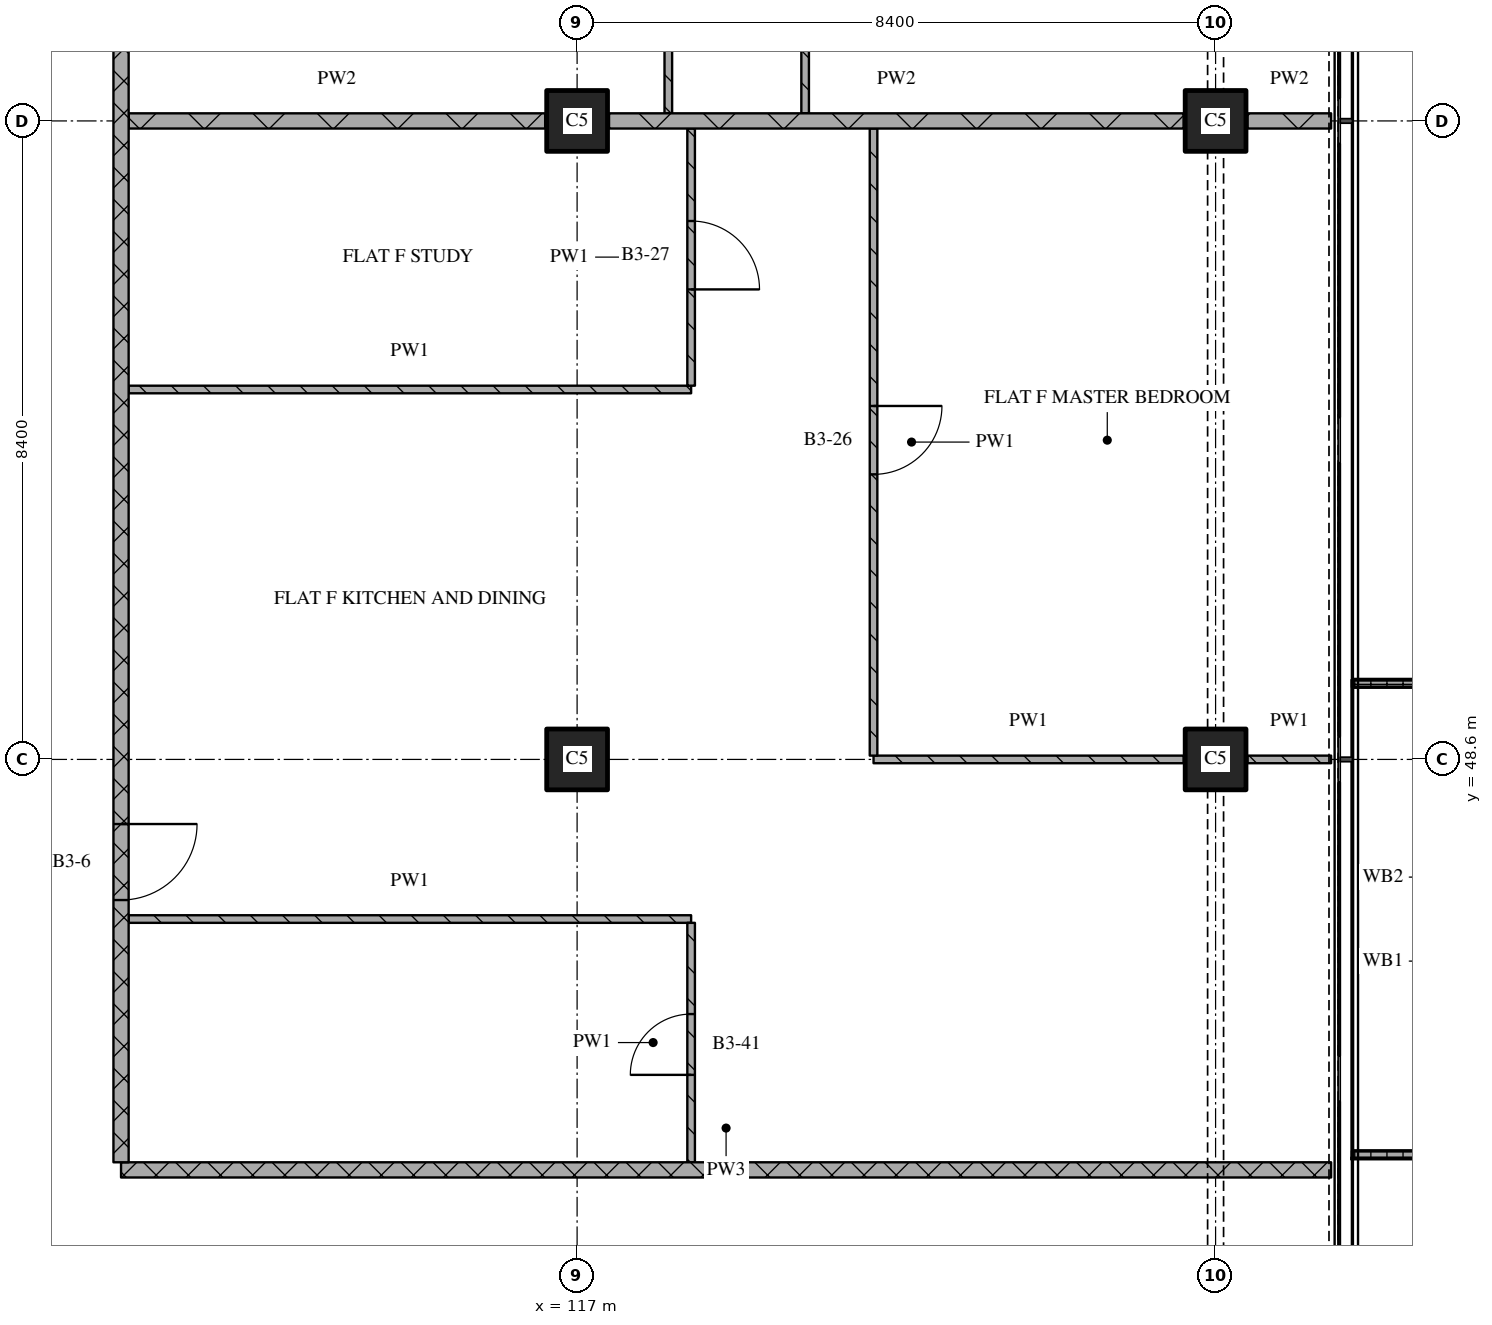
"""IFC4 building model, lengths in metres.
Left out: names, types, materials, properties, quantities, classifications, styles, units other than length and angle.
Written with IfcOpenShell. Run it as: python <this file> out.ifc"""

import sys

from ifc_helpers import new_model, si_unit, direction, frame, frame_2d, origin, origin_2d, place, context, subcontext, project, spatial, polyline, rectangle, outline, extrude, element, fill, save


model = new_model("IFC4")
c1 = context("Model", 3, precision=1e-05, world=origin(), true_north=direction((0.0, 1.0)))
c2 = subcontext(c1, "Body", "Model", "MODEL_VIEW")
j1 = project(units=[si_unit("LENGTHUNIT", "METRE"), si_unit("PLANEANGLEUNIT", "RADIAN")], contexts=[c1])
p1 = place(None, origin())
s1 = spatial("IfcSite", under=j1, at=p1, CompositionType="ELEMENT")
p2 = place(p1, origin())
s2 = spatial("IfcBuilding", under=s1, at=p2, CompositionType="ELEMENT")
p3 = place(p2, frame((0.0, 0.0, 120.45)))
s3 = spatial("IfcBuildingStorey", under=s2, at=p3, CompositionType="ELEMENT", Elevation=120.45)
for number, where, z_axis, x_axis in (
    (1, (117.0, 48.6, 0.0), (0.0, 0.0, 1.0), (1.0, 0.0, 0.0)),
    (2, (117.0, 57.0, 0.0), (0.0, 0.0, 1.0), (1.0, 0.0, 0.0)),
    (3, (125.4, 48.6, 0.0), (0.0, 0.0, 1.0), (1.0, 0.0, 0.0)),
    (4, (125.4, 57.0, 0.0), (0.0, 0.0, 1.0), (1.0, 0.0, 0.0)),
):
    element("IfcColumn", number, at=place(p3, frame(where, z_axis=z_axis, x_axis=x_axis)), inside=s3, PredefinedType="COLUMN", context=c2, shape_type="SweptSolid", body=[
        extrude(rectangle(XDim=0.8, YDim=0.8, at=origin_2d()), origin(), (0.0, 0.0, 1.0), 3.6),
    ])
p4 = place(p3, origin())
e5 = element("IfcWall", 5, at=p4, inside=s3, PredefinedType="SOLIDWALL", context=c2, shape_type="SweptSolid", body=[
    extrude(outline(polyline([(127.2, 43.35), (127.2, 43.45), (128.967, 43.45), (128.967, 49.55), (127.2, 49.55), (127.2, 49.65), (129.067, 49.65), (129.067, 43.35), (127.2, 43.35)])), origin(), (0.0, 0.0, 1.0), 1.0),
])
p5 = place(p3, frame((111.0, 43.2, 0.0), z_axis=(0.0, 0.0, 1.0), x_axis=(1.0, 0.0, 0.0)))
e6 = element("IfcWall", 6, at=p5, inside=s3, PredefinedType="PARTITIONING", context=c2, shape_type="SweptSolid", body=[
    extrude(rectangle(XDim=15.92, YDim=0.2, at=frame_2d((7.96, 0.0))), origin(), (0.0, 0.0, 1.0), 3.32),
])
p6 = place(p3, frame((111.1, 46.5, 0.0), z_axis=(0.0, 0.0, 1.0), x_axis=(1.0, 0.0, 0.0)))
e7 = element("IfcWall", 7, at=p6, inside=s3, PredefinedType="PARTITIONING", context=c2, shape_type="SweptSolid", body=[
    extrude(rectangle(XDim=7.4, YDim=0.1, at=frame_2d((3.7, 0.0))), origin(), (0.0, 0.0, 1.0), 3.32),
])
p7 = place(p3, frame((120.9, 48.6, 0.0), z_axis=(0.0, 0.0, 1.0), x_axis=(1.0, 0.0, 0.0)))
e8 = element("IfcWall", 8, at=p7, inside=s3, PredefinedType="PARTITIONING", context=c2, shape_type="SweptSolid", body=[
    extrude(rectangle(XDim=4.08, YDim=0.1, at=frame_2d((2.04, 0.0))), origin(), (0.0, 0.0, 1.0), 3.32),
])
p8 = place(p3, frame((125.82, 48.6, 0.0), z_axis=(0.0, 0.0, 1.0), x_axis=(1.0, 0.0, 0.0)))
e9 = element("IfcWall", 9, at=p8, inside=s3, PredefinedType="PARTITIONING", context=c2, shape_type="SweptSolid", body=[
    extrude(rectangle(XDim=1.1, YDim=0.1, at=frame_2d((0.55, 0.0))), origin(), (0.0, 0.0, 1.0), 3.32),
])
p9 = place(p3, frame((111.1, 53.467, 0.0), z_axis=(0.0, 0.0, 1.0), x_axis=(1.0, 0.0, 0.0)))
e10 = element("IfcWall", 10, at=p9, inside=s3, PredefinedType="PARTITIONING", context=c2, shape_type="SweptSolid", body=[
    extrude(rectangle(XDim=7.4, YDim=0.1, at=frame_2d((3.7, 0.0))), origin(), (0.0, 0.0, 1.0), 3.32),
])
p10 = place(p3, frame((111.1, 57.0, 0.0), z_axis=(0.0, 0.0, 1.0), x_axis=(1.0, 0.0, 0.0)))
e11 = element("IfcWall", 11, at=p10, inside=s3, PredefinedType="PARTITIONING", context=c2, shape_type="SweptSolid", body=[
    extrude(rectangle(XDim=5.48, YDim=0.2, at=frame_2d((2.74, 0.0))), origin(), (0.0, 0.0, 1.0), 3.32),
])
p11 = place(p3, frame((117.42, 57.0, 0.0), z_axis=(0.0, 0.0, 1.0), x_axis=(1.0, 0.0, 0.0)))
e12 = element("IfcWall", 12, at=p11, inside=s3, PredefinedType="PARTITIONING", context=c2, shape_type="SweptSolid", body=[
    extrude(rectangle(XDim=7.56, YDim=0.2, at=frame_2d((3.78, 0.0))), origin(), (0.0, 0.0, 1.0), 3.32),
])
p12 = place(p3, frame((125.82, 57.0, 0.0), z_axis=(0.0, 0.0, 1.0), x_axis=(1.0, 0.0, 0.0)))
e13 = element("IfcWall", 13, at=p12, inside=s3, PredefinedType="PARTITIONING", context=c2, shape_type="SweptSolid", body=[
    extrude(rectangle(XDim=1.1, YDim=0.2, at=frame_2d((0.55, 0.0))), origin(), (0.0, 0.0, 1.0), 3.32),
])
p13 = place(p3, frame((111.0, 75.32, 0.0), z_axis=(0.0, 0.0, 1.0), x_axis=(0.0, -1.0, 0.0)))
e14 = element("IfcWall", 14, at=p13, inside=s3, PredefinedType="PARTITIONING", context=c2, shape_type="SweptSolid", body=[
    extrude(rectangle(XDim=32.02, YDim=0.2, at=frame_2d((16.01, 0.0))), origin(), (0.0, 0.0, 1.0), 3.32),
])
p14 = place(p13, frame((11.37, 0.0, 0.0)))
e15 = element("IfcOpeningElement", 15, at=p14, cuts=e14, PredefinedType="OPENING", context=c2, shape_type="SweptSolid", body=[
    extrude(rectangle(XDim=1.0, YDim=2.1, at=frame_2d((0.5, 1.05))), frame((0.0, 0.11, 0.0), z_axis=(0.0, -1.0, 0.0), x_axis=(1.0, 0.0, 0.0)), (0.0, 0.0, 1.0), 0.22),
])
p15 = place(p13, frame((27.57, 0.0, 0.0)))
e16 = element("IfcOpeningElement", 16, at=p15, cuts=e14, PredefinedType="OPENING", context=c2, shape_type="SweptSolid", body=[
    extrude(rectangle(XDim=1.0, YDim=2.1, at=frame_2d((0.5, 1.05))), frame((0.0, 0.11, 0.0), z_axis=(0.0, -1.0, 0.0), x_axis=(1.0, 0.0, 0.0)), (0.0, 0.0, 1.0), 0.22),
])
p16 = place(p3, frame((118.2, 57.1, 0.0), z_axis=(0.0, 0.0, 1.0), x_axis=(0.0, 1.0, 0.0)))
e17 = element("IfcWall", 17, at=p16, inside=s3, PredefinedType="PARTITIONING", context=c2, shape_type="SweptSolid", body=[
    extrude(rectangle(XDim=5.55, YDim=0.1, at=frame_2d((2.775, 0.0))), origin(), (0.0, 0.0, 1.0), 3.32),
])
p17 = place(p16, frame((1.3, 0.0, 0.0)))
e18 = element("IfcOpeningElement", 18, at=p17, cuts=e17, PredefinedType="OPENING", context=c2, shape_type="SweptSolid", body=[
    extrude(rectangle(XDim=0.8, YDim=2.1, at=frame_2d((0.4, 1.05))), frame((0.0, 0.06, 0.0), z_axis=(0.0, -1.0, 0.0), x_axis=(1.0, 0.0, 0.0)), (0.0, 0.0, 1.0), 0.12),
])
p18 = place(p16, frame((4.15, 0.0, 0.0)))
e19 = element("IfcOpeningElement", 19, at=p18, cuts=e17, PredefinedType="OPENING", context=c2, shape_type="SweptSolid", body=[
    extrude(rectangle(XDim=0.8, YDim=2.1, at=frame_2d((0.4, 1.05))), frame((0.0, 0.06, 0.0), z_axis=(0.0, -1.0, 0.0), x_axis=(1.0, 0.0, 0.0)), (0.0, 0.0, 1.0), 0.12),
])
p19 = place(p3, frame((118.5, 43.3, 0.0), z_axis=(0.0, 0.0, 1.0), x_axis=(0.0, 1.0, 0.0)))
e20 = element("IfcWall", 20, at=p19, inside=s3, PredefinedType="PARTITIONING", context=c2, shape_type="SweptSolid", body=[
    extrude(rectangle(XDim=3.15, YDim=0.1, at=frame_2d((1.575, 0.0))), origin(), (0.0, 0.0, 1.0), 3.32),
])
p20 = place(p19, frame((1.15, 0.0, 0.0)))
e21 = element("IfcOpeningElement", 21, at=p20, cuts=e20, PredefinedType="OPENING", context=c2, shape_type="SweptSolid", body=[
    extrude(rectangle(XDim=0.8, YDim=2.1, at=frame_2d((0.4, 1.05))), frame((0.0, 0.06, 0.0), z_axis=(0.0, -1.0, 0.0), x_axis=(1.0, 0.0, 0.0)), (0.0, 0.0, 1.0), 0.12),
])
p21 = place(p3, frame((118.5, 53.517, 0.0), z_axis=(0.0, 0.0, 1.0), x_axis=(0.0, 1.0, 0.0)))
e22 = element("IfcWall", 22, at=p21, inside=s3, PredefinedType="PARTITIONING", context=c2, shape_type="SweptSolid", body=[
    extrude(rectangle(XDim=3.383, YDim=0.1, at=frame_2d((1.692, 0.0))), origin(), (0.0, 0.0, 1.0), 3.32),
])
p22 = place(p21, frame((1.267, 0.0, 0.0)))
e23 = element("IfcOpeningElement", 23, at=p22, cuts=e22, PredefinedType="OPENING", context=c2, shape_type="SweptSolid", body=[
    extrude(rectangle(XDim=0.9, YDim=2.1, at=frame_2d((0.45, 1.05))), frame((0.0, 0.06, 0.0), z_axis=(0.0, -1.0, 0.0), x_axis=(1.0, 0.0, 0.0)), (0.0, 0.0, 1.0), 0.12),
])
p23 = place(p3, frame((120.0, 65.35, 0.0), z_axis=(0.0, 0.0, 1.0), x_axis=(0.0, -1.0, 0.0)))
e24 = element("IfcWall", 24, at=p23, inside=s3, PredefinedType="PARTITIONING", context=c2, shape_type="SweptSolid", body=[
    extrude(rectangle(XDim=8.25, YDim=0.1, at=frame_2d((4.125, 0.0))), origin(), (0.0, 0.0, 1.0), 3.32),
])
p24 = place(p3, frame((120.9, 56.9, 0.0), z_axis=(0.0, 0.0, 1.0), x_axis=(0.0, -1.0, 0.0)))
e25 = element("IfcWall", 25, at=p24, inside=s3, PredefinedType="PARTITIONING", context=c2, shape_type="SweptSolid", body=[
    extrude(rectangle(XDim=8.25, YDim=0.1, at=frame_2d((4.125, 0.0))), origin(), (0.0, 0.0, 1.0), 3.32),
])
p25 = place(p24, frame((3.65, 0.0, 0.0)))
e26 = element("IfcOpeningElement", 26, at=p25, cuts=e25, PredefinedType="OPENING", context=c2, shape_type="SweptSolid", body=[
    extrude(rectangle(XDim=0.9, YDim=2.1, at=frame_2d((0.45, 1.05))), frame((0.0, 0.06, 0.0), z_axis=(0.0, -1.0, 0.0), x_axis=(1.0, 0.0, 0.0)), (0.0, 0.0, 1.0), 0.12),
])
p26 = place(p15, origin())
e27 = element("IfcDoor", 27, at=p26, inside=s3, OperationType="SINGLE_SWING_LEFT", PredefinedType="DOOR", context=c2, shape_type="SweptSolid", body=[
    extrude(rectangle(XDim=1.0, YDim=2.1, at=frame_2d((0.5, 1.05))), frame((0.0, 0.025, 0.0), z_axis=(0.0, -1.0, 0.0), x_axis=(1.0, 0.0, 0.0)), (0.0, 0.0, 1.0), 0.05),
])
fill(e16, e27)
p27 = place(p20, origin())
e28 = element("IfcDoor", 28, at=p27, inside=s3, OperationType="SINGLE_SWING_LEFT", PredefinedType="DOOR", context=c2, shape_type="SweptSolid", body=[
    extrude(rectangle(XDim=0.8, YDim=2.1, at=frame_2d((0.4, 1.05))), frame((0.0, 0.025, 0.0), z_axis=(0.0, -1.0, 0.0), x_axis=(1.0, 0.0, 0.0)), (0.0, 0.0, 1.0), 0.05),
])
fill(e21, e28)
p28 = place(p22, origin())
e29 = element("IfcDoor", 29, at=p28, inside=s3, OperationType="SINGLE_SWING_RIGHT", PredefinedType="DOOR", context=c2, shape_type="SweptSolid", body=[
    extrude(rectangle(XDim=0.9, YDim=2.1, at=frame_2d((0.45, 1.05))), frame((0.0, 0.025, 0.0), z_axis=(0.0, -1.0, 0.0), x_axis=(1.0, 0.0, 0.0)), (0.0, 0.0, 1.0), 0.05),
])
fill(e23, e29)
p29 = place(p25, origin())
e30 = element("IfcDoor", 30, at=p29, inside=s3, OperationType="SINGLE_SWING_LEFT", PredefinedType="DOOR", context=c2, shape_type="SweptSolid", body=[
    extrude(rectangle(XDim=0.9, YDim=2.1, at=frame_2d((0.45, 1.05))), frame((0.0, 0.025, 0.0), z_axis=(0.0, -1.0, 0.0), x_axis=(1.0, 0.0, 0.0)), (0.0, 0.0, 1.0), 0.05),
])
fill(e26, e30)
save(model, sys.argv[1])
